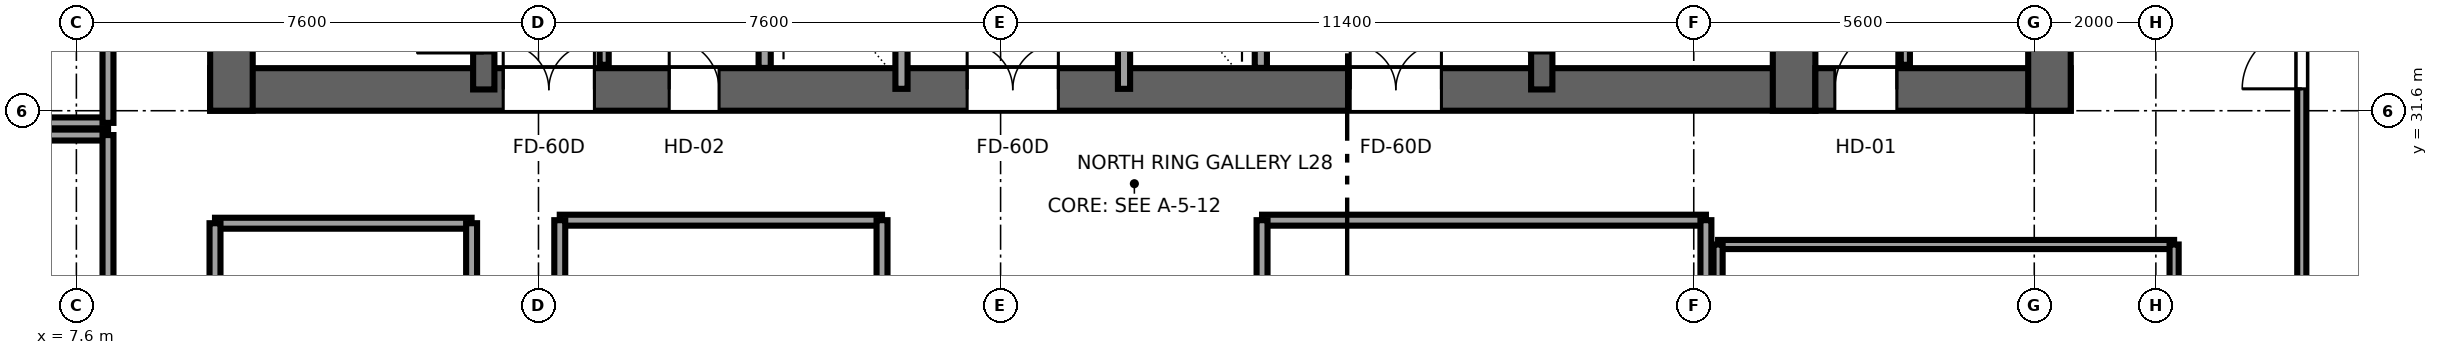
"""IFC4 building model, lengths in metres.
Left out: names, types, materials, properties, quantities, classifications, styles, units other than length and angle.
Written with IfcOpenShell. Run it as: python <this file> out.ifc"""

import sys

from ifc_helpers import new_model, si_unit, direction, frame, frame_2d, origin, place, context, subcontext, project, spatial, rectangle, extrude, source, transform, mapped, element, fill, save


model = new_model("IFC4")
c1 = context("Model", 3, precision=1e-05, world=origin(), true_north=direction((0.0, 1.0)))
c2 = subcontext(c1, "Body", "Model", "MODEL_VIEW")
j1 = project(units=[si_unit("LENGTHUNIT", "METRE"), si_unit("PLANEANGLEUNIT", "RADIAN")], contexts=[c1])
p1 = place(None, origin())
s1 = spatial("IfcSite", under=j1, at=p1, CompositionType="ELEMENT")
p2 = place(p1, origin())
s2 = spatial("IfcBuilding", under=s1, at=p2, CompositionType="ELEMENT")
p3 = place(p2, frame((0.0, 0.0, 111.55)))
s3 = spatial("IfcBuildingStorey", under=s2, at=p3, CompositionType="ELEMENT", Elevation=111.55)
p4 = place(p3, frame((9.8, 31.95, 0.0), z_axis=(0.0, 0.0, 1.0), x_axis=(1.0, 0.0, 0.0)))
e1 = element("IfcWall", 1, at=p4, inside=s3, PredefinedType="SHEAR", context=c2, shape_type="SweptSolid", body=[
    extrude(rectangle(XDim=26.4, YDim=0.7, at=frame_2d((13.2, 0.0))), origin(), (0.0, 0.0, 1.0), 3.55),
])
p5 = place(p4, frame((6.32, 0.0, 0.0), z_axis=(0.0, 0.0, 1.0), x_axis=(-1.0, 0.0, 0.0)))
e2 = element("IfcOpeningElement", 2, at=p5, cuts=e1, PredefinedType="OPENING", context=c2, shape_type="SweptSolid", body=[
    extrude(rectangle(XDim=1.5, YDim=2.04, at=frame_2d((0.75, 1.02))), frame((0.0, 0.36, 0.0), z_axis=(0.0, -1.0, 0.0), x_axis=(1.0, 0.0, 0.0)), (0.0, 0.0, 1.0), 0.72),
])
p6 = place(p4, frame((13.95, 0.0, 0.0), z_axis=(0.0, 0.0, 1.0), x_axis=(-1.0, 0.0, 0.0)))
e3 = element("IfcOpeningElement", 3, at=p6, cuts=e1, PredefinedType="OPENING", context=c2, shape_type="SweptSolid", body=[
    extrude(rectangle(XDim=1.5, YDim=2.04, at=frame_2d((0.75, 1.02))), frame((0.0, 0.36, 0.0), z_axis=(0.0, -1.0, 0.0), x_axis=(1.0, 0.0, 0.0)), (0.0, 0.0, 1.0), 0.72),
])
p7 = place(p4, frame((20.25, 0.0, 0.0), z_axis=(0.0, 0.0, 1.0), x_axis=(-1.0, 0.0, 0.0)))
e4 = element("IfcOpeningElement", 4, at=p7, cuts=e1, PredefinedType="OPENING", context=c2, shape_type="SweptSolid", body=[
    extrude(rectangle(XDim=1.5, YDim=2.04, at=frame_2d((0.75, 1.02))), frame((0.0, 0.36, 0.0), z_axis=(0.0, -1.0, 0.0), x_axis=(1.0, 0.0, 0.0)), (0.0, 0.0, 1.0), 0.72),
])
p8 = place(p4, frame((8.37, 0.0, 0.0), z_axis=(0.0, 0.0, 1.0), x_axis=(-1.0, 0.0, 0.0)))
e5 = element("IfcOpeningElement", 5, at=p8, cuts=e1, PredefinedType="OPENING", context=c2, shape_type="SweptSolid", body=[
    extrude(rectangle(XDim=0.82, YDim=2.01, at=frame_2d((0.41, 1.005))), frame((0.0, 0.36, 0.0), z_axis=(0.0, -1.0, 0.0), x_axis=(1.0, 0.0, 0.0)), (0.0, 0.0, 1.0), 0.72),
])
for number, where, z_axis, x_axis in (
    (6, (10.15, 31.6, 0.0), (0.0, 0.0, 1.0), (0.0, 1.0, 0.0)),
    (7, (35.85, 31.6, 0.0), (0.0, 0.0, 1.0), (0.0, 1.0, 0.0)),
):
    element("IfcWall", number, at=place(p3, frame(where, z_axis=z_axis, x_axis=x_axis)), inside=s3, PredefinedType="SHEAR", context=c2, shape_type="SweptSolid", body=[
        extrude(rectangle(XDim=13.6, YDim=0.7, at=frame_2d((6.8, 0.0))), origin(), (0.0, 0.0, 1.0), 3.55),
    ])
p9 = place(p3, frame((14.3, 31.95, 0.0), z_axis=(0.0, 0.0, 1.0), x_axis=(0.0, 1.0, 0.0)))
e8 = element("IfcWall", 8, at=p9, inside=s3, PredefinedType="SHEAR", context=c2, shape_type="SweptSolid", body=[
    extrude(rectangle(XDim=12.9, YDim=0.35, at=frame_2d((6.45, 0.0))), origin(), (0.0, 0.0, 1.0), 3.55),
])
p10 = place(p9, frame((0.6, 0.0, 0.0)))
e9 = element("IfcOpeningElement", 9, at=p10, cuts=e8, PredefinedType="OPENING", context=c2, shape_type="SweptSolid", body=[
    extrude(rectangle(XDim=1.1, YDim=2.12, at=frame_2d((0.55, 1.06))), frame((0.0, 0.185, 0.0), z_axis=(0.0, -1.0, 0.0), x_axis=(1.0, 0.0, 0.0)), (0.0, 0.0, 1.0), 0.37),
])
p11 = place(p3, frame((31.7, 31.95, 0.0), z_axis=(0.0, 0.0, 1.0), x_axis=(0.0, 1.0, 0.0)))
e10 = element("IfcWall", 10, at=p11, inside=s3, PredefinedType="SHEAR", context=c2, shape_type="SweptSolid", body=[
    extrude(rectangle(XDim=12.9, YDim=0.35, at=frame_2d((6.45, 0.0))), origin(), (0.0, 0.0, 1.0), 3.55),
])
p12 = place(p11, frame((1.7, 0.0, 0.0), z_axis=(0.0, 0.0, 1.0), x_axis=(-1.0, 0.0, 0.0)))
e11 = element("IfcOpeningElement", 11, at=p12, cuts=e10, PredefinedType="OPENING", context=c2, shape_type="SweptSolid", body=[
    extrude(rectangle(XDim=1.1, YDim=2.12, at=frame_2d((0.55, 1.06))), frame((0.0, 0.185, 0.0), z_axis=(0.0, -1.0, 0.0), x_axis=(1.0, 0.0, 0.0)), (0.0, 0.0, 1.0), 0.37),
])
p13 = place(p3, frame((36.2, 31.95, 0.0), z_axis=(0.0, 0.0, 1.0), x_axis=(1.0, 0.0, 0.0)))
e12 = element("IfcWall", 12, at=p13, inside=s3, PredefinedType="SHEAR", context=c2, shape_type="SweptSolid", body=[
    extrude(rectangle(XDim=4.2, YDim=0.7, at=frame_2d((2.1, 0.0))), origin(), (0.0, 0.0, 1.0), 3.55),
])
p14 = place(p13, frame((1.34, 0.0, 0.0), z_axis=(0.0, 0.0, 1.0), x_axis=(-1.0, 0.0, 0.0)))
e13 = element("IfcOpeningElement", 13, at=p14, cuts=e12, PredefinedType="OPENING", context=c2, shape_type="SweptSolid", body=[
    extrude(rectangle(XDim=1.02, YDim=2.03, at=frame_2d((0.51, 1.015))), frame((0.0, 0.36, 0.0), z_axis=(0.0, -1.0, 0.0), x_axis=(1.0, 0.0, 0.0)), (0.0, 0.0, 1.0), 0.72),
])
p15 = place(p3, frame((40.05, 31.6, 0.0), z_axis=(0.0, 0.0, 1.0), x_axis=(0.0, 1.0, 0.0)))
e14 = element("IfcWall", 14, at=p15, inside=s3, PredefinedType="SHEAR", context=c2, shape_type="SweptSolid", body=[
    extrude(rectangle(XDim=13.6, YDim=0.7, at=frame_2d((6.8, 0.0))), origin(), (0.0, 0.0, 1.0), 3.55),
])
for number, where, z_axis, x_axis in (
    (15, (18.92, 32.304, 0.0), (0.0, 0.0, 1.0), (0.0, 1.0, 0.0)),
    (16, (27.08, 32.304, 0.0), (0.0, 0.0, 1.0), (0.0, 1.0, 0.0)),
):
    element("IfcWall", number, at=place(p3, frame(where, z_axis=z_axis, x_axis=x_axis)), inside=s3, PredefinedType="SOLIDWALL", context=c2, shape_type="SweptSolid", body=[
        extrude(rectangle(XDim=3.846, YDim=0.2, at=frame_2d((1.923, 0.0))), origin(), (0.0, 0.0, 1.0), 3.37),
    ])
p16 = place(p3, frame((21.17, 31.96, 0.0), z_axis=(0.0, 0.0, 1.0), x_axis=(0.0, 1.0, 0.0)))
e17 = element("IfcWall", 17, at=p16, inside=s3, PredefinedType="SOLIDWALL", context=c2, shape_type="SweptSolid", body=[
    extrude(rectangle(XDim=12.58, YDim=0.2, at=frame_2d((6.29, 0.0))), origin(), (0.0, 0.0, 1.0), 3.37),
])
p17 = place(p16, frame((5.74, 0.0, 0.0)))
e18 = element("IfcOpeningElement", 18, at=p17, cuts=e17, PredefinedType="OPENING", context=c2, shape_type="SweptSolid", body=[
    extrude(rectangle(XDim=1.1, YDim=2.12, at=frame_2d((0.55, 1.06))), frame((0.0, 0.11, 0.0), z_axis=(0.0, -1.0, 0.0), x_axis=(1.0, 0.0, 0.0)), (0.0, 0.0, 1.0), 0.22),
])
p18 = place(p16, frame((8.24, 0.0, 0.0)))
e19 = element("IfcOpeningElement", 19, at=p18, cuts=e17, PredefinedType="OPENING", context=c2, shape_type="SweptSolid", body=[
    extrude(rectangle(XDim=1.1, YDim=2.12, at=frame_2d((0.55, 1.06))), frame((0.0, 0.11, 0.0), z_axis=(0.0, -1.0, 0.0), x_axis=(1.0, 0.0, 0.0)), (0.0, 0.0, 1.0), 0.22),
])
p19 = place(p3, frame((24.83, 31.96, 0.0), z_axis=(0.0, 0.0, 1.0), x_axis=(0.0, 1.0, 0.0)))
e20 = element("IfcWall", 20, at=p19, inside=s3, PredefinedType="SOLIDWALL", context=c2, shape_type="SweptSolid", body=[
    extrude(rectangle(XDim=12.58, YDim=0.2, at=frame_2d((6.29, 0.0))), origin(), (0.0, 0.0, 1.0), 3.37),
])
p20 = place(p19, frame((5.74, 0.0, 0.0)))
e21 = element("IfcOpeningElement", 21, at=p20, cuts=e20, PredefinedType="OPENING", context=c2, shape_type="SweptSolid", body=[
    extrude(rectangle(XDim=1.1, YDim=2.12, at=frame_2d((0.55, 1.06))), frame((0.0, 0.11, 0.0), z_axis=(0.0, -1.0, 0.0), x_axis=(1.0, 0.0, 0.0)), (0.0, 0.0, 1.0), 0.22),
])
p21 = place(p19, frame((8.24, 0.0, 0.0)))
e22 = element("IfcOpeningElement", 22, at=p21, cuts=e20, PredefinedType="OPENING", context=c2, shape_type="SweptSolid", body=[
    extrude(rectangle(XDim=1.1, YDim=2.12, at=frame_2d((0.55, 1.06))), frame((0.0, 0.11, 0.0), z_axis=(0.0, -1.0, 0.0), x_axis=(1.0, 0.0, 0.0)), (0.0, 0.0, 1.0), 0.22),
])
p22 = place(p3, frame((16.28, 32.355, 0.0), z_axis=(0.0, 0.0, 1.0), x_axis=(0.0, 1.0, 0.0)))
e23 = element("IfcWall", 23, at=p22, inside=s3, PredefinedType="PARTITIONING", context=c2, shape_type="SweptSolid", body=[
    extrude(rectangle(XDim=0.865, YDim=0.15, at=frame_2d((0.433, 0.0))), origin(), (0.0, 0.0, 1.0), 3.37),
])
p23 = place(p3, frame((37.68, 32.355, 0.0), z_axis=(0.0, 0.0, 1.0), x_axis=(0.0, 1.0, 0.0)))
e24 = element("IfcWall", 24, at=p23, inside=s3, PredefinedType="PARTITIONING", context=c2, shape_type="SweptSolid", body=[
    extrude(rectangle(XDim=3.845, YDim=0.15, at=frame_2d((1.922, 0.0))), origin(), (0.0, 0.0, 1.0), 3.37),
])
p24 = place(p23, frame((1.413, 0.0, 0.0)))
e25 = element("IfcOpeningElement", 25, at=p24, cuts=e24, PredefinedType="OPENING", context=c2, shape_type="SweptSolid", body=[
    extrude(rectangle(XDim=1.02, YDim=2.03, at=frame_2d((0.51, 1.015))), frame((0.0, 0.085, 0.0), z_axis=(0.0, -1.0, 0.0), x_axis=(1.0, 0.0, 0.0)), (0.0, 0.0, 1.0), 0.17),
])
p25 = place(p3, frame((0.405, 31.2, 0.0), z_axis=(0.0, 0.0, 1.0), x_axis=(1.0, 0.0, 0.0)))
e26 = element("IfcWall", 26, at=p25, inside=s3, PredefinedType="PARTITIONING", context=c2, shape_type="SweptSolid", body=[
    extrude(rectangle(XDim=7.715, YDim=0.18, at=frame_2d((3.857, 0.0))), origin(), (0.0, 0.0, 1.0), 3.37),
])
p26 = place(p3, frame((8.12, 23.3, 0.0), z_axis=(0.0, 0.0, 1.0), x_axis=(0.0, 1.0, 0.0)))
e27 = element("IfcWall", 27, at=p26, inside=s3, PredefinedType="PARTITIONING", context=c2, shape_type="SweptSolid", body=[
    extrude(rectangle(XDim=7.9, YDim=0.18, at=frame_2d((3.95, 0.0))), origin(), (0.0, 0.0, 1.0), 3.37),
])
p27 = place(p26, frame((3.125, 0.0, 0.0)))
e28 = element("IfcOpeningElement", 28, at=p27, cuts=e27, PredefinedType="OPENING", context=c2, shape_type="SweptSolid", body=[
    extrude(rectangle(XDim=1.65, YDim=2.15, at=frame_2d((0.825, 1.075))), frame((0.0, 0.1, 0.0), z_axis=(0.0, -1.0, 0.0), x_axis=(1.0, 0.0, 0.0)), (0.0, 0.0, 1.0), 0.2),
])
p28 = place(p3, frame((0.405, 31.4, 0.0), z_axis=(0.0, 0.0, 1.0), x_axis=(1.0, 0.0, 0.0)))
e29 = element("IfcWall", 29, at=p28, inside=s3, PredefinedType="PARTITIONING", context=c2, shape_type="SweptSolid", body=[
    extrude(rectangle(XDim=7.715, YDim=0.18, at=frame_2d((3.857, 0.0))), origin(), (0.0, 0.0, 1.0), 3.37),
])
p29 = place(p3, frame((8.12, 31.4, 0.0), z_axis=(0.0, 0.0, 1.0), x_axis=(0.0, 1.0, 0.0)))
e30 = element("IfcWall", 30, at=p29, inside=s3, PredefinedType="PARTITIONING", context=c2, shape_type="SweptSolid", body=[
    extrude(rectangle(XDim=6.8, YDim=0.18, at=frame_2d((3.4, 0.0))), origin(), (0.0, 0.0, 1.0), 3.37),
])
p30 = place(p29, frame((3.175, 0.0, 0.0)))
e31 = element("IfcOpeningElement", 31, at=p30, cuts=e30, PredefinedType="OPENING", context=c2, shape_type="SweptSolid", body=[
    extrude(rectangle(XDim=1.65, YDim=2.15, at=frame_2d((0.825, 1.075))), frame((0.0, 0.1, 0.0), z_axis=(0.0, -1.0, 0.0), x_axis=(1.0, 0.0, 0.0)), (0.0, 0.0, 1.0), 0.2),
])
p31 = place(p3, frame((44.2, 27.38, 0.0), z_axis=(0.0, 0.0, 1.0), x_axis=(0.0, 1.0, 0.0)))
e32 = element("IfcWall", 32, at=p31, inside=s3, PredefinedType="PARTITIONING", context=c2, shape_type="SweptSolid", body=[
    extrude(rectangle(XDim=10.14, YDim=0.15, at=frame_2d((5.07, 0.0))), origin(), (0.0, 0.0, 1.0), 3.37),
])
p32 = place(p31, frame((4.58, 0.0, 0.0)))
e33 = element("IfcOpeningElement", 33, at=p32, cuts=e32, PredefinedType="OPENING", context=c2, shape_type="SweptSolid", body=[
    extrude(rectangle(XDim=0.98, YDim=2.12, at=frame_2d((0.49, 1.06))), frame((0.0, 0.085, 0.0), z_axis=(0.0, -1.0, 0.0), x_axis=(1.0, 0.0, 0.0)), (0.0, 0.0, 1.0), 0.17),
])
p33 = place(p3, frame((9.88, 29.75, 0.0), z_axis=(0.0, 0.0, 1.0), x_axis=(1.0, 0.0, 0.0)))
e34 = element("IfcWall", 34, at=p33, inside=s3, PredefinedType="PARTITIONING", context=c2, shape_type="SweptSolid", body=[
    extrude(rectangle(XDim=4.22, YDim=0.18, at=frame_2d((2.11, 0.0))), origin(), (0.0, 0.0, 1.0), 3.37),
])
for number, where, z_axis, x_axis in (
    (35, (9.88, 23.3, 0.0), (0.0, 0.0, 1.0), (0.0, 1.0, 0.0)),
    (36, (14.1, 23.3, 0.0), (0.0, 0.0, 1.0), (0.0, 1.0, 0.0)),
):
    element("IfcWall", number, at=place(p3, frame(where, z_axis=z_axis, x_axis=x_axis)), inside=s3, PredefinedType="PARTITIONING", context=c2, shape_type="SweptSolid", body=[
        extrude(rectangle(XDim=6.45, YDim=0.18, at=frame_2d((3.225, 0.0))), origin(), (0.0, 0.0, 1.0), 3.37),
    ])
p34 = place(p3, frame((27.1, 29.8, 0.0), z_axis=(0.0, 0.0, 1.0), x_axis=(1.0, 0.0, 0.0)))
e37 = element("IfcWall", 37, at=p34, inside=s3, PredefinedType="PARTITIONING", context=c2, shape_type="SweptSolid", body=[
    extrude(rectangle(XDim=7.3, YDim=0.18, at=frame_2d((3.65, 0.0))), origin(), (0.0, 0.0, 1.0), 3.37),
])
for number, where, z_axis, x_axis in (
    (38, (27.1, 23.3, 0.0), (0.0, 0.0, 1.0), (0.0, 1.0, 0.0)),
    (39, (34.4, 23.3, 0.0), (0.0, 0.0, 1.0), (0.0, 1.0, 0.0)),
):
    element("IfcWall", number, at=place(p3, frame(where, z_axis=z_axis, x_axis=x_axis)), inside=s3, PredefinedType="PARTITIONING", context=c2, shape_type="SweptSolid", body=[
        extrude(rectangle(XDim=6.5, YDim=0.18, at=frame_2d((3.25, 0.0))), origin(), (0.0, 0.0, 1.0), 3.37),
    ])
p35 = place(p3, frame((15.55, 29.8, 0.0), z_axis=(0.0, 0.0, 1.0), x_axis=(1.0, 0.0, 0.0)))
e40 = element("IfcWall", 40, at=p35, inside=s3, PredefinedType="PARTITIONING", context=c2, shape_type="SweptSolid", body=[
    extrude(rectangle(XDim=5.3, YDim=0.18, at=frame_2d((2.65, 0.0))), origin(), (0.0, 0.0, 1.0), 3.37),
])
for number, where, z_axis, x_axis in (
    (41, (15.55, 23.3, 0.0), (0.0, 0.0, 1.0), (0.0, 1.0, 0.0)),
    (42, (20.85, 23.3, 0.0), (0.0, 0.0, 1.0), (0.0, 1.0, 0.0)),
):
    element("IfcWall", number, at=place(p3, frame(where, z_axis=z_axis, x_axis=x_axis)), inside=s3, PredefinedType="PARTITIONING", context=c2, shape_type="SweptSolid", body=[
        extrude(rectangle(XDim=6.5, YDim=0.18, at=frame_2d((3.25, 0.0))), origin(), (0.0, 0.0, 1.0), 3.37),
    ])
p36 = place(p3, frame((34.6, 29.4, 0.0), z_axis=(0.0, 0.0, 1.0), x_axis=(1.0, 0.0, 0.0)))
e43 = element("IfcWall", 43, at=p36, inside=s3, PredefinedType="PARTITIONING", context=c2, shape_type="SweptSolid", body=[
    extrude(rectangle(XDim=7.5, YDim=0.15, at=frame_2d((3.75, 0.0))), origin(), (0.0, 0.0, 1.0), 3.37),
])
p37 = place(p3, frame((34.6, 23.3, 0.0), z_axis=(0.0, 0.0, 1.0), x_axis=(0.0, 1.0, 0.0)))
e44 = element("IfcWall", 44, at=p37, inside=s3, PredefinedType="PARTITIONING", context=c2, shape_type="SweptSolid", body=[
    extrude(rectangle(XDim=6.1, YDim=0.15, at=frame_2d((3.05, 0.0))), origin(), (0.0, 0.0, 1.0), 3.37),
])
p38 = place(p3, frame((42.1, 23.3, 0.0), z_axis=(0.0, 0.0, 1.0), x_axis=(0.0, 1.0, 0.0)))
e45 = element("IfcWall", 45, at=p38, inside=s3, PredefinedType="PARTITIONING", context=c2, shape_type="SweptSolid", body=[
    extrude(rectangle(XDim=6.1, YDim=0.15, at=frame_2d((3.05, 0.0))), origin(), (0.0, 0.0, 1.0), 2.16),
])
m1 = source(origin(), c2, "Body", "SweptSolid", [
    extrude(rectangle(XDim=1.1, YDim=2.12, at=frame_2d((0.55, 1.06))), frame((0.0, 0.025, 0.0), z_axis=(0.0, -1.0, 0.0), x_axis=(1.0, 0.0, 0.0)), (0.0, 0.0, 1.0), 0.05),
])
p39 = place(p10, origin())
e46 = element("IfcDoor", 46, at=p39, inside=s3, OperationType="SINGLE_SWING_LEFT", PredefinedType="DOOR", context=c2, shape_type="MappedRepresentation", body=[
    mapped(m1, transform((0.0, 0.0, 0.0), x_axis=(1.0, 0.0, 0.0), y_axis=(0.0, 1.0, 0.0), z_axis=(0.0, 0.0, 1.0), scale=1.0)),
])
fill(e9, e46)
p40 = place(p12, origin())
e47 = element("IfcDoor", 47, at=p40, inside=s3, OperationType="SINGLE_SWING_RIGHT", PredefinedType="DOOR", context=c2, shape_type="MappedRepresentation", body=[
    mapped(m1, transform((0.0, 0.0, 0.0), x_axis=(1.0, 0.0, 0.0), y_axis=(0.0, 1.0, 0.0), z_axis=(0.0, 0.0, 1.0), scale=1.0)),
])
fill(e11, e47)
m2 = source(origin(), c2, "Body", "SweptSolid", [
    extrude(rectangle(XDim=1.5, YDim=2.04, at=frame_2d((0.75, 1.02))), frame((0.0, 0.025, 0.0), z_axis=(0.0, -1.0, 0.0), x_axis=(1.0, 0.0, 0.0)), (0.0, 0.0, 1.0), 0.05),
])
p41 = place(p5, origin())
e48 = element("IfcDoor", 48, at=p41, inside=s3, OperationType="DOUBLE_DOOR_SINGLE_SWING", PredefinedType="DOOR", context=c2, shape_type="MappedRepresentation", body=[
    mapped(m2, transform((0.0, 0.0, 0.0), x_axis=(1.0, 0.0, 0.0), y_axis=(0.0, 1.0, 0.0), z_axis=(0.0, 0.0, 1.0), scale=1.0)),
])
fill(e2, e48)
p42 = place(p6, origin())
e49 = element("IfcDoor", 49, at=p42, inside=s3, OperationType="DOUBLE_DOOR_SINGLE_SWING", PredefinedType="DOOR", context=c2, shape_type="MappedRepresentation", body=[
    mapped(m2, transform((0.0, 0.0, 0.0), x_axis=(1.0, 0.0, 0.0), y_axis=(0.0, 1.0, 0.0), z_axis=(0.0, 0.0, 1.0), scale=1.0)),
])
fill(e3, e49)
p43 = place(p7, origin())
e50 = element("IfcDoor", 50, at=p43, inside=s3, OperationType="DOUBLE_DOOR_SINGLE_SWING", PredefinedType="DOOR", context=c2, shape_type="MappedRepresentation", body=[
    mapped(m2, transform((0.0, 0.0, 0.0), x_axis=(1.0, 0.0, 0.0), y_axis=(0.0, 1.0, 0.0), z_axis=(0.0, 0.0, 1.0), scale=1.0)),
])
fill(e4, e50)
m3 = source(origin(), c2, "Body", "SweptSolid", [
    extrude(rectangle(XDim=0.82, YDim=2.01, at=frame_2d((0.41, 1.005))), frame((0.0, 0.025, 0.0), z_axis=(0.0, -1.0, 0.0), x_axis=(1.0, 0.0, 0.0)), (0.0, 0.0, 1.0), 0.05),
])
p44 = place(p8, origin())
e51 = element("IfcDoor", 51, at=p44, inside=s3, OperationType="SINGLE_SWING_LEFT", PredefinedType="DOOR", context=c2, shape_type="MappedRepresentation", body=[
    mapped(m3, transform((0.0, 0.0, 0.0), x_axis=(1.0, 0.0, 0.0), y_axis=(0.0, 1.0, 0.0), z_axis=(0.0, 0.0, 1.0), scale=1.0)),
])
fill(e5, e51)
m4 = source(origin(), c2, "Body", "SweptSolid", [
    extrude(rectangle(XDim=1.02, YDim=2.03, at=frame_2d((0.51, 1.015))), frame((0.0, 0.025, 0.0), z_axis=(0.0, -1.0, 0.0), x_axis=(1.0, 0.0, 0.0)), (0.0, 0.0, 1.0), 0.05),
])
p45 = place(p14, origin())
e52 = element("IfcDoor", 52, at=p45, inside=s3, OperationType="SINGLE_SWING_RIGHT", PredefinedType="DOOR", context=c2, shape_type="MappedRepresentation", body=[
    mapped(m4, transform((0.0, 0.0, 0.0), x_axis=(1.0, 0.0, 0.0), y_axis=(0.0, 1.0, 0.0), z_axis=(0.0, 0.0, 1.0), scale=1.0)),
])
fill(e13, e52)
m5 = source(origin(), c2, "Body", "SweptSolid", [
    extrude(rectangle(XDim=0.98, YDim=2.12, at=frame_2d((0.49, 1.06))), frame((0.0, 0.025, 0.0), z_axis=(0.0, -1.0, 0.0), x_axis=(1.0, 0.0, 0.0)), (0.0, 0.0, 1.0), 0.05),
])
p46 = place(p32, origin())
e53 = element("IfcDoor", 53, at=p46, inside=s3, OperationType="SINGLE_SWING_LEFT", PredefinedType="DOOR", context=c2, shape_type="MappedRepresentation", body=[
    mapped(m5, transform((0.0, 0.0, 0.0), x_axis=(1.0, 0.0, 0.0), y_axis=(0.0, 1.0, 0.0), z_axis=(0.0, 0.0, 1.0), scale=1.0)),
])
fill(e33, e53)
save(model, sys.argv[1])
